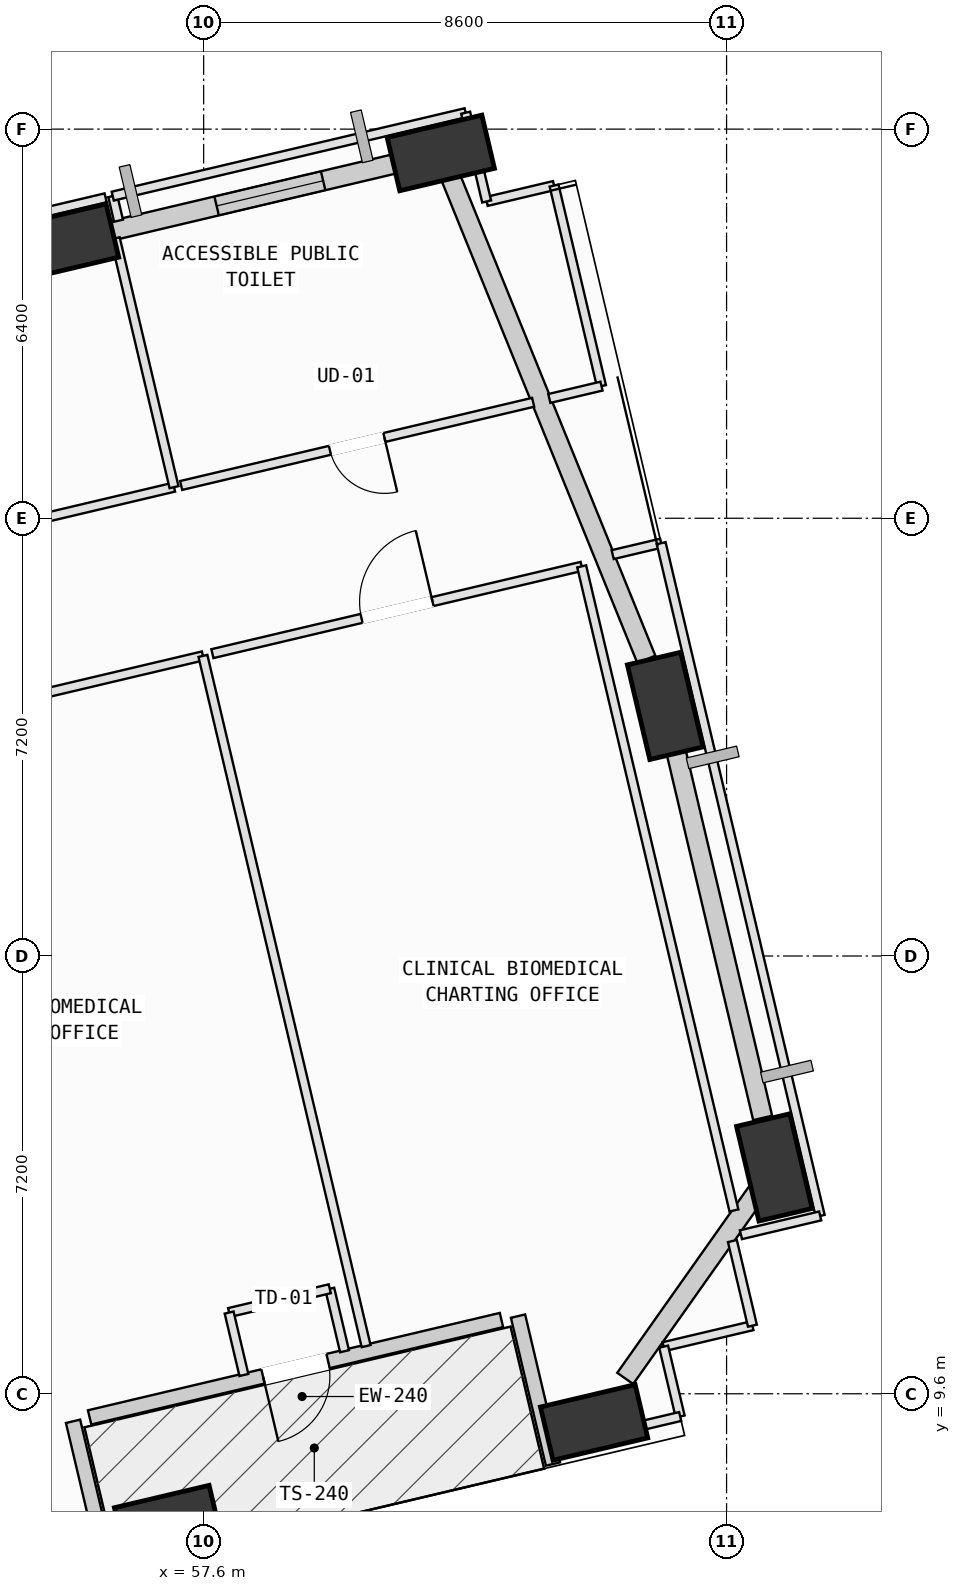
"""IFC4 building model, lengths in metres.
Left out: names, types, materials, properties, quantities, classifications, styles, units other than length and angle.
Written with IfcOpenShell. Run it as: python <this file> out.ifc"""

import sys

from ifc_helpers import new_model, si_unit, direction, frame, frame_2d, origin, origin_2d, place, context, subcontext, project, spatial, rectangle, extrude, element, fill, save


model = new_model("IFC4")
c1 = context("Model", 3, precision=1e-05, world=origin(), true_north=direction((0.0, 1.0)))
c2 = subcontext(c1, "Body", "Model", "MODEL_VIEW")
j1 = project(units=[si_unit("LENGTHUNIT", "METRE"), si_unit("PLANEANGLEUNIT", "RADIAN")], contexts=[c1])
p1 = place(None, origin())
s1 = spatial("IfcSite", under=j1, at=p1, CompositionType="ELEMENT")
p2 = place(p1, origin())
s2 = spatial("IfcBuilding", under=s1, at=p2, CompositionType="ELEMENT")
p3 = place(p2, frame((0.0, 0.0, 79.0)))
s3 = spatial("IfcBuildingStorey", under=s2, at=p3, CompositionType="ELEMENT", Elevation=79.0)
p4 = place(p3, frame((57.014, 7.472, 0.002), z_axis=(0.070529421211, 0.096923867186, 0.992789688058), x_axis=(-0.921275075012, 0.387932734604, 0.027575887724)))
e1 = element("IfcColumn", 1, at=p4, inside=s3, PredefinedType="COLUMN", context=c2, shape_type="SweptSolid", body=[
    extrude(rectangle(XDim=1.6, YDim=0.9, at=origin_2d()), origin(), (0.0, 0.0, 1.0), 3.95),
])
p5 = place(p3, frame((64.021, 9.128, 0.002), z_axis=(0.063267908091, 0.125422597857, 0.990084008432), x_axis=(-0.971472319598, 0.234940780414, 0.032316589435)))
e2 = element("IfcColumn", 2, at=p5, inside=s3, PredefinedType="COLUMN", context=c2, shape_type="SweptSolid", body=[
    extrude(rectangle(XDim=1.6, YDim=0.9, at=origin_2d()), origin(), (0.0, 0.0, 1.0), 3.948),
])
p6 = place(p3, frame((66.986, 13.323, 0.002), z_axis=(0.045963241143, 0.137327672927, 0.989458685702), x_axis=(-0.08746818067, -0.986147900056, 0.140931318682)))
e3 = element("IfcColumn", 3, at=p6, inside=s3, PredefinedType="COLUMN", context=c2, shape_type="SweptSolid", body=[
    extrude(rectangle(XDim=1.6, YDim=0.9, at=origin_2d()), origin(), (0.0, 0.0, 1.0), 3.909),
])
p7 = place(p3, frame((65.191, 20.914, 0.002), z_axis=(0.014907968205, 0.129930116199, 0.991411073868), x_axis=(0.118569910766, -0.98475493956, 0.127274841477)))
e4 = element("IfcColumn", 4, at=p7, inside=s3, PredefinedType="COLUMN", context=c2, shape_type="SweptSolid", body=[
    extrude(rectangle(XDim=1.6, YDim=0.9, at=origin_2d()), origin(), (0.0, 0.0, 1.0), 3.914),
])
p8 = place(p3, frame((61.5, 30.008, 0.002), z_axis=(-0.022435239358, 0.114710204542, 0.993145623264), x_axis=(-0.91122897406, -0.411021576739, 0.026889036583)))
e5 = element("IfcColumn", 5, at=p8, inside=s3, PredefinedType="COLUMN", context=c2, shape_type="SweptSolid", body=[
    extrude(rectangle(XDim=1.6, YDim=0.9, at=origin_2d()), origin(), (0.0, 0.0, 1.0), 3.95),
])
p9 = place(p3, frame((55.321, 28.547, 0.002), z_axis=(-0.016232316816, 0.08955548175, 0.995849550675), x_axis=(-0.916717600894, -0.398986772208, 0.020937903777)))
e6 = element("IfcColumn", 6, at=p9, inside=s3, PredefinedType="COLUMN", context=c2, shape_type="SweptSolid", body=[
    extrude(rectangle(XDim=1.6, YDim=0.9, at=origin_2d()), origin(), (0.0, 0.0, 1.0), 3.956),
])
p10 = place(p3, frame((62.498, 10.813, 0.0), z_axis=(0.0, 0.0, 1.0), x_axis=(-0.973180186611, -0.230044179209, 0.0)))
e7 = element("IfcWall", 7, at=p10, inside=s3, PredefinedType="SOLIDWALL", context=c2, shape_type="SweptSolid", body=[
    extrude(rectangle(XDim=6.96, YDim=0.24, at=frame_2d((3.48, 0.0))), origin(), (0.0, 0.0, 1.0), 3.085),
])
p11 = place(p10, frame((2.93, 0.0, 0.0)))
e8 = element("IfcOpeningElement", 8, at=p11, cuts=e7, PredefinedType="OPENING", context=c2, shape_type="SweptSolid", body=[
    extrude(rectangle(XDim=1.1, YDim=2.15, at=frame_2d((0.55, 1.075))), frame((0.0, 0.13, 0.0), z_axis=(0.0, -1.0, 0.0), x_axis=(1.0, 0.0, 0.0)), (0.0, 0.0, 1.0), 0.26),
])
for number, where, z_axis, x_axis in (
    (9, (55.452, 9.147, 0.0), (0.0, 0.0, 1.0), (0.23, -0.973, 0.0)),
    (10, (63.345, 8.444, 0.0), (0.0, 0.0, 1.0), (-0.23, 0.973, 0.0)),
):
    element("IfcWall", number, at=place(p3, frame(where, z_axis=z_axis, x_axis=x_axis)), inside=s3, PredefinedType="SOLIDWALL", context=c2, shape_type="SweptSolid", body=[
        extrude(rectangle(XDim=2.5, YDim=0.24, at=frame_2d((1.25, 0.0))), origin(), (0.0, 0.0, 1.0), 3.085),
    ])
p12 = place(p3, frame((66.8, 13.06, 0.0), z_axis=(0.0, 0.0, 1.0), x_axis=(-0.577144343994, -0.816642153085, 0.0)))
e11 = element("IfcWall", 11, at=p12, inside=s3, PredefinedType="SOLIDWALL", context=c2, shape_type="SweptSolid", body=[
    extrude(rectangle(XDim=3.928, YDim=0.32, at=frame_2d((1.964, 0.0))), origin(), (0.0, 0.0, 1.0), 3.085),
])
p13 = place(p3, frame((65.273, 20.57, 0.0), z_axis=(0.0, 0.0, 1.0), x_axis=(0.230027361935, -0.973184161791, 0.0)))
e12 = element("IfcWall", 12, at=p13, inside=s3, PredefinedType="SOLIDWALL", context=c2, shape_type="SweptSolid", body=[
    extrude(rectangle(XDim=6.61, YDim=0.32, at=frame_2d((3.305, 0.0))), origin(), (0.0, 0.0, 1.0), 3.085),
])
p14 = place(p3, frame((61.641, 29.66, 0.0), z_axis=(0.0, 0.0, 1.0), x_axis=(0.376057718022, -0.926596240396, 0.0)))
e13 = element("IfcWall", 13, at=p14, inside=s3, PredefinedType="SOLIDWALL", context=c2, shape_type="SweptSolid", body=[
    extrude(rectangle(XDim=8.614, YDim=0.32, at=frame_2d((4.307, 0.0))), origin(), (0.0, 0.0, 1.0), 3.085),
])
p15 = place(p3, frame((55.894, 28.683, 0.0), z_axis=(0.0, 0.0, 1.0), x_axis=(0.973172593569, 0.230076298489, 0.0)))
e14 = element("IfcWall", 14, at=p15, inside=s3, PredefinedType="SOLIDWALL", context=c2, shape_type="SweptSolid", body=[
    extrude(rectangle(XDim=5.209, YDim=0.32, at=frame_2d((2.604, 0.0))), origin(), (0.0, 0.0, 1.0), 3.085),
])
p16 = place(p15, frame((1.972, 0.0, 0.75)))
e15 = element("IfcOpeningElement", 15, at=p16, cuts=e14, PredefinedType="OPENING", context=c2, shape_type="SweptSolid", body=[
    extrude(rectangle(XDim=1.8, YDim=2.05, at=frame_2d((0.9, 1.025))), frame((0.0, 0.17, 0.0), z_axis=(0.0, -1.0, 0.0), x_axis=(1.0, 0.0, 0.0)), (0.0, 0.0, 1.0), 0.34),
])
p17 = place(p3, frame((49.569, 19.841, 0.0), z_axis=(0.0, 0.0, 1.0), x_axis=(0.973193656839, 0.229987187224, 0.0)))
e16 = element("IfcWall", 16, at=p17, inside=s3, PredefinedType="PARTITIONING", context=c2, shape_type="SweptSolid", body=[
    extrude(rectangle(XDim=8.24, YDim=0.15, at=frame_2d((4.12, 0.0))), origin(), (0.0, 0.0, 1.0), 3.7),
])
p18 = place(p17, frame((3.52, 0.0, 0.0)))
e17 = element("IfcOpeningElement", 17, at=p18, cuts=e16, PredefinedType="OPENING", context=c2, shape_type="SweptSolid", body=[
    extrude(rectangle(XDim=1.2, YDim=2.15, at=frame_2d((0.6, 1.075))), frame((0.0, 0.085, 0.0), z_axis=(0.0, -1.0, 0.0), x_axis=(1.0, 0.0, 0.0)), (0.0, 0.0, 1.0), 0.17),
])
p19 = place(p3, frame((57.588, 21.736, 0.0), z_axis=(0.0, 0.0, 1.0), x_axis=(0.230096091154, -0.973167913998, 0.0)))
e18 = element("IfcWall", 18, at=p19, inside=s3, PredefinedType="PARTITIONING", context=c2, shape_type="SweptSolid", body=[
    extrude(rectangle(XDim=11.665, YDim=0.15, at=frame_2d((5.833, 0.0))), origin(), (0.0, 0.0, 1.0), 3.7),
])
p20 = place(p3, frame((59.917, 10.3, 0.0), z_axis=(0.0, 0.0, 1.0), x_axis=(-0.230212703989, 0.97314033465, 0.0)))
e19 = element("IfcWall", 19, at=p20, inside=s3, PredefinedType="PARTITIONING", context=c2, shape_type="SweptSolid", body=[
    extrude(rectangle(XDim=1.055, YDim=0.15, at=frame_2d((0.528, 0.0))), origin(), (0.0, 0.0, 1.0), 3.7),
])
p21 = place(p3, frame((59.674, 11.327, 0.0), z_axis=(0.0, 0.0, 1.0), x_axis=(-0.973226668125, -0.229847454738, 0.0)))
e20 = element("IfcWall", 20, at=p21, inside=s3, PredefinedType="PARTITIONING", context=c2, shape_type="SweptSolid", body=[
    extrude(rectangle(XDim=1.7, YDim=0.15, at=frame_2d((0.85, 0.0))), origin(), (0.0, 0.0, 1.0), 3.7),
])
p22 = place(p3, frame((58.019, 10.936, 0.0), z_axis=(0.0, 0.0, 1.0), x_axis=(0.230160881779, -0.973152592607, 0.0)))
e21 = element("IfcWall", 21, at=p22, inside=s3, PredefinedType="PARTITIONING", context=c2, shape_type="SweptSolid", body=[
    extrude(rectangle(XDim=1.055, YDim=0.15, at=frame_2d((0.528, 0.0))), origin(), (0.0, 0.0, 1.0), 3.7),
])
p23 = place(p3, frame((66.625, 10.72, 0.0), z_axis=(0.0, 0.0, 1.0), x_axis=(-0.973201169856, -0.229955393479, 0.0)))
e22 = element("IfcWall", 22, at=p23, inside=s3, PredefinedType="PARTITIONING", context=c2, shape_type="SweptSolid", body=[
    extrude(rectangle(XDim=1.5, YDim=0.15, at=frame_2d((0.75, 0.0))), origin(), (0.0, 0.0, 1.0), 3.7),
])
p24 = place(p3, frame((65.165, 10.375, 0.0), z_axis=(0.0, 0.0, 1.0), x_axis=(0.230353026145, -0.973107128401, 0.0)))
e23 = element("IfcWall", 23, at=p24, inside=s3, PredefinedType="PARTITIONING", context=c2, shape_type="SweptSolid", body=[
    extrude(rectangle(XDim=1.181, YDim=0.15, at=frame_2d((0.59, 0.0))), origin(), (0.0, 0.0, 1.0), 3.7),
])
p25 = place(p3, frame((65.437, 9.226, 0.0), z_axis=(0.0, 0.0, 1.0), x_axis=(-0.973267487159, -0.229674548957, 0.0)))
e24 = element("IfcWall", 24, at=p25, inside=s3, PredefinedType="PARTITIONING", context=c2, shape_type="SweptSolid", body=[
    extrude(rectangle(XDim=2.121, YDim=0.15, at=frame_2d((1.06, 0.0))), origin(), (0.0, 0.0, 1.0), 3.7),
])
p26 = place(p3, frame((57.744, 21.773, 0.0), z_axis=(0.0, 0.0, 1.0), x_axis=(0.973163112175, 0.230116399028, 0.0)))
e25 = element("IfcWall", 25, at=p26, inside=s3, PredefinedType="PARTITIONING", context=c2, shape_type="SweptSolid", body=[
    extrude(rectangle(XDim=6.24, YDim=0.15, at=frame_2d((3.12, 0.0))), origin(), (0.0, 0.0, 1.0), 3.7),
])
p27 = place(p26, frame((2.52, 0.0, 0.0)))
e26 = element("IfcOpeningElement", 26, at=p27, cuts=e25, PredefinedType="OPENING", context=c2, shape_type="SweptSolid", body=[
    extrude(rectangle(XDim=1.2, YDim=2.15, at=frame_2d((0.6, 1.075))), frame((0.0, 0.085, 0.0), z_axis=(0.0, -1.0, 0.0), x_axis=(1.0, 0.0, 0.0)), (0.0, 0.0, 1.0), 0.17),
])
p28 = place(p3, frame((63.817, 23.209, 0.0), z_axis=(0.0, 0.0, 1.0), x_axis=(0.230035494886, -0.973182239405, 0.0)))
e27 = element("IfcWall", 27, at=p28, inside=s3, PredefinedType="PARTITIONING", context=c2, shape_type="SweptSolid", body=[
    extrude(rectangle(XDim=10.886, YDim=0.15, at=frame_2d((5.443, 0.0))), origin(), (0.0, 0.0, 1.0), 3.7),
])
p29 = place(p3, frame((66.296, 12.112, 0.0), z_axis=(0.0, 0.0, 1.0), x_axis=(0.230066598953, -0.97317488667, 0.0)))
e28 = element("IfcWall", 28, at=p29, inside=s3, PredefinedType="PARTITIONING", context=c2, shape_type="SweptSolid", body=[
    extrude(rectangle(XDim=1.43, YDim=0.15, at=frame_2d((0.715, 0.0))), origin(), (0.0, 0.0, 1.0), 3.7),
])
p30 = place(p3, frame((57.113, 24.511, 0.0), z_axis=(0.0, 0.0, 1.0), x_axis=(-0.973189270561, -0.230005747024, 0.0)))
e29 = element("IfcWall", 29, at=p30, inside=s3, PredefinedType="PARTITIONING", context=c2, shape_type="SweptSolid", body=[
    extrude(rectangle(XDim=9.813, YDim=0.15, at=frame_2d((4.907, 0.0))), origin(), (0.0, 0.0, 1.0), 3.7),
])
p31 = place(p30, frame((4.306, 0.0, 0.0)))
e30 = element("IfcOpeningElement", 30, at=p31, cuts=e29, PredefinedType="OPENING", context=c2, shape_type="SweptSolid", body=[
    extrude(rectangle(XDim=1.2, YDim=2.15, at=frame_2d((0.6, 1.075))), frame((0.0, 0.085, 0.0), z_axis=(0.0, -1.0, 0.0), x_axis=(1.0, 0.0, 0.0)), (0.0, 0.0, 1.0), 0.17),
])
p32 = place(p3, frame((46.438, 27.013, 0.0), z_axis=(0.0, 0.0, 1.0), x_axis=(0.973189270561, 0.230005747024, 0.0)))
e31 = element("IfcWall", 31, at=p32, inside=s3, PredefinedType="PARTITIONING", context=c2, shape_type="SweptSolid", body=[
    extrude(rectangle(XDim=9.813, YDim=0.15, at=frame_2d((4.907, 0.0))), origin(), (0.0, 0.0, 1.0), 3.085),
])
p33 = place(p3, frame((56.146, 28.604, 0.0), z_axis=(0.0, 0.0, 1.0), x_axis=(0.229935488388, -0.973205872968, 0.0)))
e32 = element("IfcWall", 32, at=p33, inside=s3, PredefinedType="PARTITIONING", context=c2, shape_type="SweptSolid", body=[
    extrude(rectangle(XDim=4.206, YDim=0.15, at=frame_2d((2.103, 0.0))), origin(), (0.0, 0.0, 1.0), 3.7),
])
p34 = place(p3, frame((62.254, 29.21, 0.0), z_axis=(0.0, 0.0, 1.0), x_axis=(0.973222963846, 0.22986313894, 0.0)))
e33 = element("IfcWall", 33, at=p34, inside=s3, PredefinedType="PARTITIONING", context=c2, shape_type="SweptSolid", body=[
    extrude(rectangle(XDim=1.14, YDim=0.15, at=frame_2d((0.57, 0.0))), origin(), (0.0, 0.0, 1.0), 3.7),
])
p35 = place(p3, frame((63.363, 29.472, 0.0), z_axis=(0.0, 0.0, 1.0), x_axis=(0.230111027356, -0.973164382357, 0.0)))
e34 = element("IfcWall", 34, at=p35, inside=s3, PredefinedType="PARTITIONING", context=c2, shape_type="SweptSolid", body=[
    extrude(rectangle(XDim=3.39, YDim=0.15, at=frame_2d((1.695, 0.0))), origin(), (0.0, 0.0, 1.0), 3.7),
])
p36 = place(p3, frame((64.143, 26.173, 0.0), z_axis=(0.0, 0.0, 1.0), x_axis=(-0.973111321647, -0.230335311411, 0.0)))
e35 = element("IfcWall", 35, at=p36, inside=s3, PredefinedType="PARTITIONING", context=c2, shape_type="SweptSolid", body=[
    extrude(rectangle(XDim=0.882, YDim=0.15, at=frame_2d((0.441, 0.0))), origin(), (0.0, 0.0, 1.0), 3.7),
])
p37 = place(p3, frame((63.019, 25.907, 0.0), z_axis=(0.0, 0.0, 1.0), x_axis=(-0.973199812054, -0.2299611398, 0.0)))
e36 = element("IfcWall", 36, at=p37, inside=s3, PredefinedType="PARTITIONING", context=c2, shape_type="SweptSolid", body=[
    extrude(rectangle(XDim=5.948, YDim=0.15, at=frame_2d((2.974, 0.0))), origin(), (0.0, 0.0, 1.0), 3.7),
])
p38 = place(p37, frame((2.514, 0.0, 0.0)))
e37 = element("IfcOpeningElement", 37, at=p38, cuts=e36, PredefinedType="OPENING", context=c2, shape_type="SweptSolid", body=[
    extrude(rectangle(XDim=0.92, YDim=2.1, at=frame_2d((0.46, 1.05))), frame((0.0, 0.085, 0.0), z_axis=(0.0, -1.0, 0.0), x_axis=(1.0, 0.0, 0.0)), (0.0, 0.0, 1.0), 0.17),
])
p39 = place(p3, frame((56.2, 28.894, 0.0), z_axis=(0.0, 0.0, 1.0), x_axis=(-0.228809832901, 0.973471139977, 0.0)))
e38 = element("IfcWall", 38, at=p39, inside=s3, PredefinedType="PARTITIONING", context=c2, shape_type="SweptSolid", body=[
    extrude(rectangle(XDim=0.415, YDim=0.15, at=frame_2d((0.208, 0.0))), origin(), (0.0, 0.0, 1.0), 3.7),
])
p40 = place(p3, frame((56.105, 29.298, 0.0), z_axis=(0.0, 0.0, 1.0), x_axis=(0.973185279241, 0.230022634251, 0.0)))
e39 = element("IfcWall", 39, at=p40, inside=s3, PredefinedType="PARTITIONING", context=c2, shape_type="SweptSolid", body=[
    extrude(rectangle(XDim=5.964, YDim=0.15, at=frame_2d((2.982, 0.0))), origin(), (0.0, 0.0, 1.0), 3.085),
])
p41 = place(p3, frame((61.909, 30.67, 0.0), z_axis=(0.0, 0.0, 1.0), x_axis=(0.229955393479, -0.973201169856, 0.0)))
e40 = element("IfcWall", 40, at=p41, inside=s3, PredefinedType="PARTITIONING", context=c2, shape_type="SweptSolid", body=[
    extrude(rectangle(XDim=1.5, YDim=0.15, at=frame_2d((0.75, 0.0))), origin(), (0.0, 0.0, 1.0), 3.085),
])
p42 = place(p3, frame((64.327, 23.402, 0.0), z_axis=(0.0, 0.0, 1.0), x_axis=(0.97329975507, 0.229537767658, 0.0)))
e41 = element("IfcWall", 41, at=p42, inside=s3, PredefinedType="PARTITIONING", context=c2, shape_type="SweptSolid", body=[
    extrude(rectangle(XDim=0.819, YDim=0.15, at=frame_2d((0.41, 0.0))), origin(), (0.0, 0.0, 1.0), 3.7),
])
p43 = place(p3, frame((65.124, 23.59, 0.0), z_axis=(0.0, 0.0, 1.0), x_axis=(0.230072041228, -0.973173600056, 0.0)))
e42 = element("IfcWall", 42, at=p43, inside=s3, PredefinedType="PARTITIONING", context=c2, shape_type="SweptSolid", body=[
    extrude(rectangle(XDim=11.37, YDim=0.15, at=frame_2d((5.685, 0.0))), origin(), (0.0, 0.0, 1.0), 3.085),
])
p44 = place(p3, frame((67.74, 12.525, 0.0), z_axis=(0.0, 0.0, 1.0), x_axis=(-0.973079212257, -0.230470923704, 0.0)))
e43 = element("IfcWall", 43, at=p44, inside=s3, PredefinedType="PARTITIONING", context=c2, shape_type="SweptSolid", body=[
    extrude(rectangle(XDim=1.34, YDim=0.15, at=frame_2d((0.67, 0.0))), origin(), (0.0, 0.0, 1.0), 3.7),
])
p45 = place(p11, origin())
e44 = element("IfcDoor", 44, at=p45, inside=s3, OperationType="SINGLE_SWING_RIGHT", PredefinedType="DOOR", context=c2, shape_type="SweptSolid", body=[
    extrude(rectangle(XDim=1.1, YDim=2.15, at=frame_2d((0.55, 1.075))), frame((0.0, 0.025, 0.0), z_axis=(0.0, -1.0, 0.0), x_axis=(1.0, 0.0, 0.0)), (0.0, 0.0, 1.0), 0.05),
])
fill(e8, e44)
p46 = place(p16, origin())
e45 = element("IfcWindow", 45, at=p46, inside=s3, PartitioningType="SINGLE_PANEL", PredefinedType="WINDOW", context=c2, shape_type="SweptSolid", body=[
    extrude(rectangle(XDim=1.8, YDim=2.05, at=frame_2d((0.9, 1.025))), frame((0.0, 0.03, 0.0), z_axis=(0.0, -1.0, 0.0), x_axis=(1.0, 0.0, 0.0)), (0.0, 0.0, 1.0), 0.06),
])
fill(e15, e45)
p47 = place(p27, origin())
e46 = element("IfcDoor", 46, at=p47, inside=s3, OperationType="SINGLE_SWING_RIGHT", PredefinedType="DOOR", context=c2, shape_type="SweptSolid", body=[
    extrude(rectangle(XDim=1.2, YDim=2.15, at=frame_2d((0.6, 1.075))), frame((0.0, 0.025, 0.0), z_axis=(0.0, -1.0, 0.0), x_axis=(1.0, 0.0, 0.0)), (0.0, 0.0, 1.0), 0.05),
])
fill(e26, e46)
p48 = place(p38, origin())
e47 = element("IfcDoor", 47, at=p48, inside=s3, OperationType="SINGLE_SWING_LEFT", PredefinedType="DOOR", context=c2, shape_type="SweptSolid", body=[
    extrude(rectangle(XDim=0.92, YDim=2.1, at=frame_2d((0.46, 1.05))), frame((0.0, 0.025, 0.0), z_axis=(0.0, -1.0, 0.0), x_axis=(1.0, 0.0, 0.0)), (0.0, 0.0, 1.0), 0.05),
])
fill(e37, e47)
save(model, sys.argv[1])
